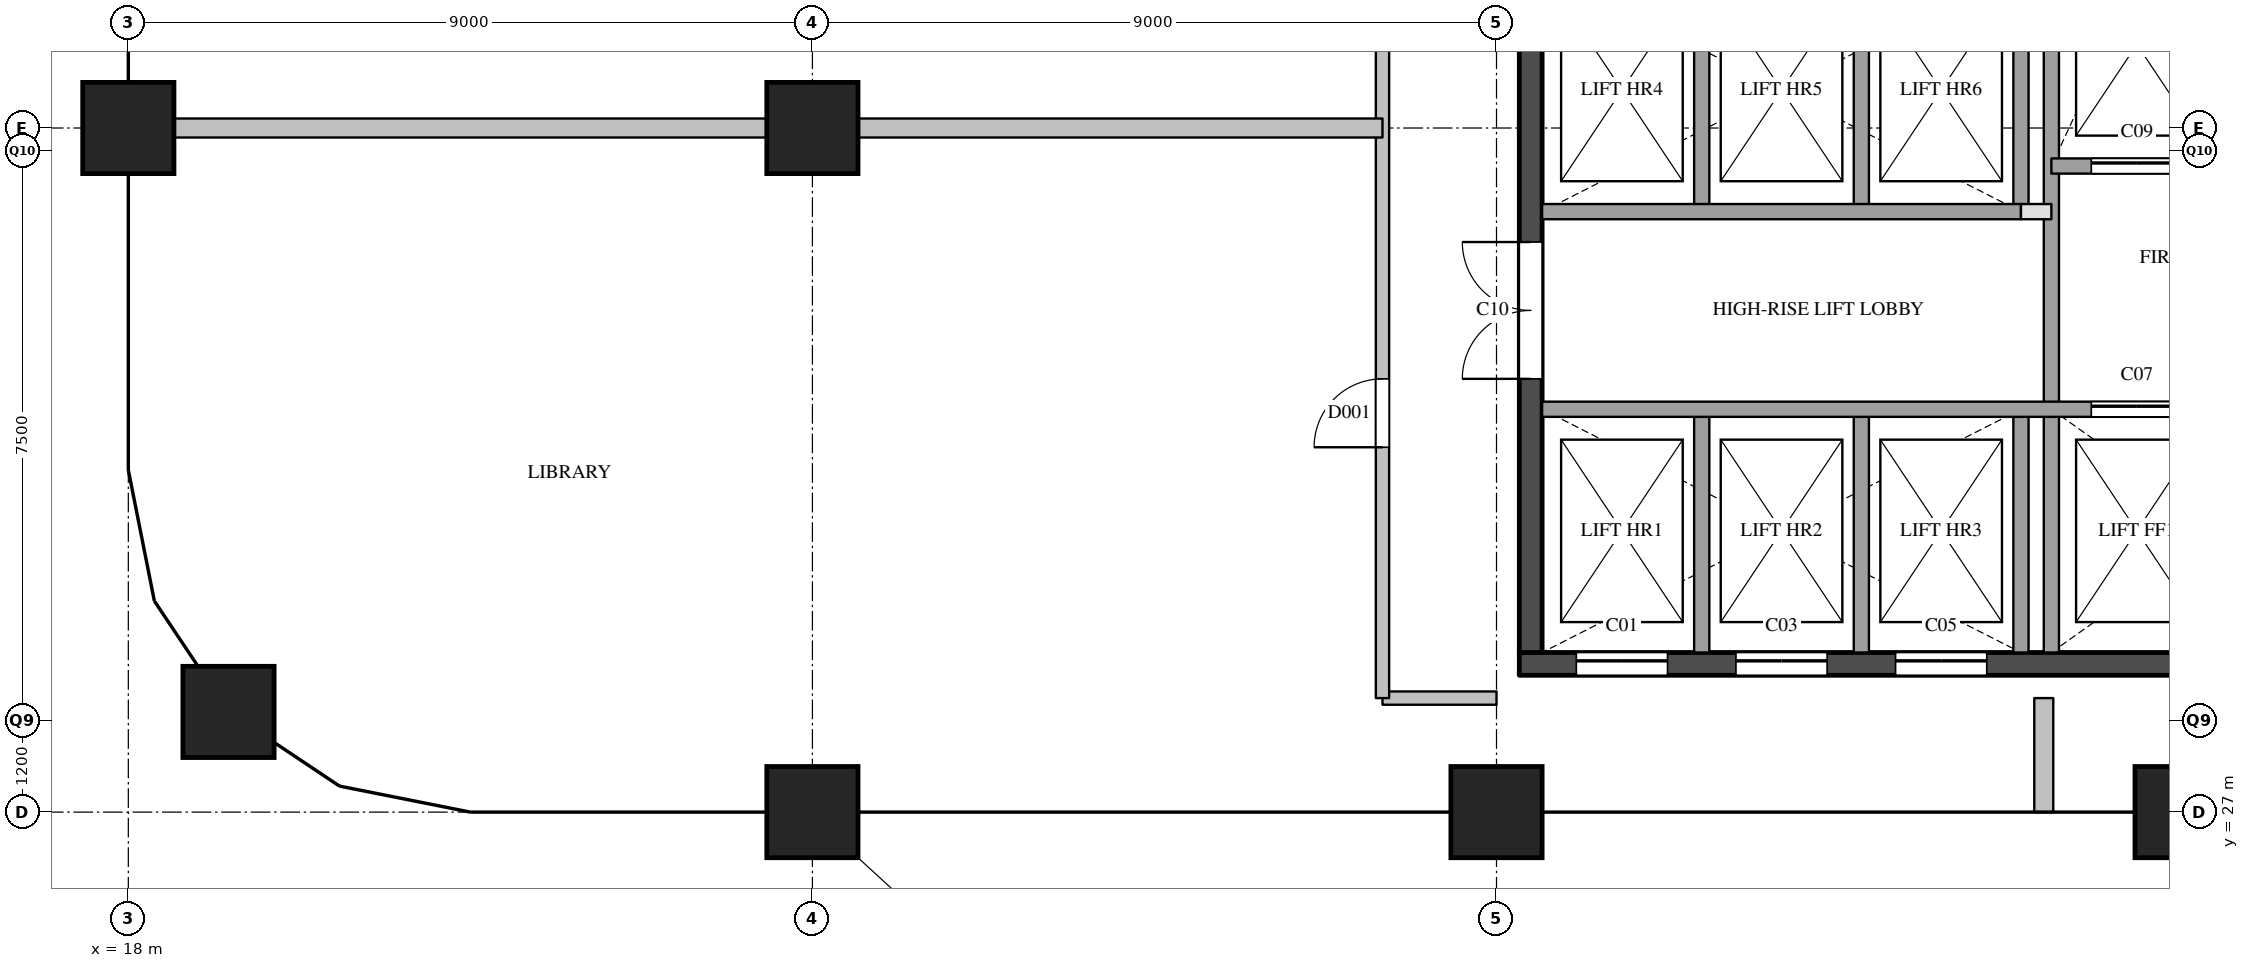
"""IFC4 building model, lengths in metres.
Left out: names, types, materials, properties, quantities, classifications, styles, units other than length and angle.
Written with IfcOpenShell. Run it as: python <this file> out.ifc"""

import sys

from ifc_helpers import new_model, si_unit, direction, frame, frame_2d, origin, origin_2d, place, context, subcontext, project, spatial, rectangle, extrude, element, fill, save


model = new_model("IFC4")
c1 = context("Model", 3, precision=1e-05, world=origin(), true_north=direction((0.0, 1.0)))
c2 = subcontext(c1, "Body", "Model", "MODEL_VIEW")
j1 = project(units=[si_unit("LENGTHUNIT", "METRE"), si_unit("PLANEANGLEUNIT", "RADIAN")], contexts=[c1])
p1 = place(None, origin())
s1 = spatial("IfcSite", under=j1, at=p1, CompositionType="ELEMENT")
p2 = place(p1, origin())
s2 = spatial("IfcBuilding", under=s1, at=p2, CompositionType="ELEMENT")
p3 = place(p2, frame((0.0, 0.0, 312.9)))
s3 = spatial("IfcBuildingStorey", under=s2, at=p3, CompositionType="ELEMENT", Elevation=312.9)
for number, where, z_axis, x_axis in (
    (1, (19.318, 28.318, 0.0), (0.0, 0.0, 1.0), (1.0, 0.0, 0.0)),
    (2, (18.0, 36.0, 0.0), (0.0, 0.0, 1.0), (1.0, 0.0, 0.0)),
    (3, (27.0, 27.0, 0.0), (0.0, 0.0, 1.0), (1.0, 0.0, 0.0)),
    (4, (27.0, 36.0, 0.0), (0.0, 0.0, 1.0), (1.0, 0.0, 0.0)),
    (5, (36.0, 27.0, 0.0), (0.0, 0.0, 1.0), (1.0, 0.0, 0.0)),
    (6, (45.0, 27.0, 0.0), (0.0, 0.0, 1.0), (1.0, 0.0, 0.0)),
):
    element("IfcColumn", number, at=place(p3, frame(where, z_axis=z_axis, x_axis=x_axis)), inside=s3, PredefinedType="COLUMN", context=c2, shape_type="SweptSolid", body=[
        extrude(rectangle(XDim=1.2, YDim=1.2, at=origin_2d()), origin(), (0.0, 0.0, 1.0), 3.9),
    ])
p4 = place(p3, frame((36.3, 28.95, 0.0), z_axis=(0.0, 0.0, 1.0), x_axis=(1.0, 0.0, 0.0)))
e7 = element("IfcWall", 7, at=p4, inside=s3, PredefinedType="SHEAR", context=c2, shape_type="SweptSolid", body=[
    extrude(rectangle(XDim=11.8, YDim=0.3, at=frame_2d((5.9, 0.0))), origin(), (0.0, 0.0, 1.0), 3.6),
])
p5 = place(p4, frame((0.75, 0.0, 0.0)))
e8 = element("IfcOpeningElement", 8, at=p5, cuts=e7, PredefinedType="OPENING", context=c2, shape_type="SweptSolid", body=[
    extrude(rectangle(XDim=1.2, YDim=2.1, at=frame_2d((0.6, 1.05))), frame((0.0, 0.16, 0.0), z_axis=(0.0, -1.0, 0.0), x_axis=(1.0, 0.0, 0.0)), (0.0, 0.0, 1.0), 0.32),
])
p6 = place(p4, frame((2.85, 0.0, 0.0)))
e9 = element("IfcOpeningElement", 9, at=p6, cuts=e7, PredefinedType="OPENING", context=c2, shape_type="SweptSolid", body=[
    extrude(rectangle(XDim=1.2, YDim=2.1, at=frame_2d((0.6, 1.05))), frame((0.0, 0.16, 0.0), z_axis=(0.0, -1.0, 0.0), x_axis=(1.0, 0.0, 0.0)), (0.0, 0.0, 1.0), 0.32),
])
p7 = place(p4, frame((4.95, 0.0, 0.0)))
e10 = element("IfcOpeningElement", 10, at=p7, cuts=e7, PredefinedType="OPENING", context=c2, shape_type="SweptSolid", body=[
    extrude(rectangle(XDim=1.2, YDim=2.1, at=frame_2d((0.6, 1.05))), frame((0.0, 0.16, 0.0), z_axis=(0.0, -1.0, 0.0), x_axis=(1.0, 0.0, 0.0)), (0.0, 0.0, 1.0), 0.32),
])
p8 = place(p3, frame((36.45, 29.1, 0.0), z_axis=(0.0, 0.0, 1.0), x_axis=(0.0, 1.0, 0.0)))
e11 = element("IfcWall", 11, at=p8, inside=s3, PredefinedType="SHEAR", context=c2, shape_type="SweptSolid", body=[
    extrude(rectangle(XDim=20.3, YDim=0.3, at=frame_2d((10.15, 0.0))), origin(), (0.0, 0.0, 1.0), 3.6),
])
p9 = place(p8, frame((3.6, 0.0, 0.0)))
e12 = element("IfcOpeningElement", 12, at=p9, cuts=e11, PredefinedType="OPENING", context=c2, shape_type="SweptSolid", body=[
    extrude(rectangle(XDim=1.8, YDim=2.1, at=frame_2d((0.9, 1.05))), frame((0.0, 0.16, 0.0), z_axis=(0.0, -1.0, 0.0), x_axis=(1.0, 0.0, 0.0)), (0.0, 0.0, 1.0), 0.32),
])
p10 = place(p8, frame((16.4, 0.0, 0.0)))
e13 = element("IfcOpeningElement", 13, at=p10, cuts=e11, PredefinedType="OPENING", context=c2, shape_type="SweptSolid", body=[
    extrude(rectangle(XDim=1.0, YDim=2.1, at=frame_2d((0.5, 1.05))), frame((0.0, 0.16, 0.0), z_axis=(0.0, -1.0, 0.0), x_axis=(1.0, 0.0, 0.0)), (0.0, 0.0, 1.0), 0.32),
])
p11 = place(p3, frame((38.7, 29.1, 0.0), z_axis=(0.0, 0.0, 1.0), x_axis=(0.0, 1.0, 0.0)))
e14 = element("IfcWall", 14, at=p11, inside=s3, PredefinedType="SOLIDWALL", context=c2, shape_type="SweptSolid", body=[
    extrude(rectangle(XDim=3.2, YDim=0.2, at=frame_2d((1.6, 0.0))), origin(), (0.0, 0.0, 1.0), 3.6),
])
p12 = place(p3, frame((38.7, 34.9, 0.0), z_axis=(0.0, 0.0, 1.0), x_axis=(0.0, 1.0, 0.0)))
e15 = element("IfcWall", 15, at=p12, inside=s3, PredefinedType="SOLIDWALL", context=c2, shape_type="SweptSolid", body=[
    extrude(rectangle(XDim=3.2, YDim=0.2, at=frame_2d((1.6, 0.0))), origin(), (0.0, 0.0, 1.0), 3.6),
])
p13 = place(p3, frame((40.8, 29.1, 0.0), z_axis=(0.0, 0.0, 1.0), x_axis=(0.0, 1.0, 0.0)))
e16 = element("IfcWall", 16, at=p13, inside=s3, PredefinedType="SOLIDWALL", context=c2, shape_type="SweptSolid", body=[
    extrude(rectangle(XDim=3.2, YDim=0.2, at=frame_2d((1.6, 0.0))), origin(), (0.0, 0.0, 1.0), 3.6),
])
p14 = place(p3, frame((40.8, 34.9, 0.0), z_axis=(0.0, 0.0, 1.0), x_axis=(0.0, 1.0, 0.0)))
e17 = element("IfcWall", 17, at=p14, inside=s3, PredefinedType="SOLIDWALL", context=c2, shape_type="SweptSolid", body=[
    extrude(rectangle(XDim=3.2, YDim=0.2, at=frame_2d((1.6, 0.0))), origin(), (0.0, 0.0, 1.0), 3.6),
])
p15 = place(p3, frame((42.9, 29.1, 0.0), z_axis=(0.0, 0.0, 1.0), x_axis=(0.0, 1.0, 0.0)))
e18 = element("IfcWall", 18, at=p15, inside=s3, PredefinedType="SOLIDWALL", context=c2, shape_type="SweptSolid", body=[
    extrude(rectangle(XDim=3.2, YDim=0.2, at=frame_2d((1.6, 0.0))), origin(), (0.0, 0.0, 1.0), 3.6),
])
p16 = place(p3, frame((42.9, 34.9, 0.0), z_axis=(0.0, 0.0, 1.0), x_axis=(0.0, 1.0, 0.0)))
e19 = element("IfcWall", 19, at=p16, inside=s3, PredefinedType="SOLIDWALL", context=c2, shape_type="SweptSolid", body=[
    extrude(rectangle(XDim=3.2, YDim=0.2, at=frame_2d((1.6, 0.0))), origin(), (0.0, 0.0, 1.0), 3.6),
])
p17 = place(p3, frame((43.3, 29.1, 0.0), z_axis=(0.0, 0.0, 1.0), x_axis=(0.0, 1.0, 0.0)))
e20 = element("IfcWall", 20, at=p17, inside=s3, PredefinedType="SOLIDWALL", context=c2, shape_type="SweptSolid", body=[
    extrude(rectangle(XDim=9.9, YDim=0.2, at=frame_2d((4.95, 0.0))), origin(), (0.0, 0.0, 1.0), 3.6),
])
p18 = place(p3, frame((36.6, 32.3, 0.0), z_axis=(0.0, 0.0, 1.0), x_axis=(1.0, 0.0, 0.0)))
e21 = element("IfcWall", 21, at=p18, inside=s3, PredefinedType="SOLIDWALL", context=c2, shape_type="SweptSolid", body=[
    extrude(rectangle(XDim=11.2, YDim=0.2, at=frame_2d((5.6, 0.0))), origin(), (0.0, 0.0, 1.0), 3.6),
])
p19 = place(p18, frame((7.225, 0.0, 0.0)))
e22 = element("IfcOpeningElement", 22, at=p19, cuts=e21, PredefinedType="OPENING", context=c2, shape_type="SweptSolid", body=[
    extrude(rectangle(XDim=1.2, YDim=2.1, at=frame_2d((0.6, 1.05))), frame((0.0, 0.11, 0.0), z_axis=(0.0, -1.0, 0.0), x_axis=(1.0, 0.0, 0.0)), (0.0, 0.0, 1.0), 0.22),
])
p20 = place(p18, frame((9.475, 0.0, 0.0)))
e23 = element("IfcOpeningElement", 23, at=p20, cuts=e21, PredefinedType="OPENING", context=c2, shape_type="SweptSolid", body=[
    extrude(rectangle(XDim=1.2, YDim=2.1, at=frame_2d((0.6, 1.05))), frame((0.0, 0.11, 0.0), z_axis=(0.0, -1.0, 0.0), x_axis=(1.0, 0.0, 0.0)), (0.0, 0.0, 1.0), 0.22),
])
p21 = place(p3, frame((42.9, 34.9, 0.0), z_axis=(0.0, 0.0, 1.0), x_axis=(1.0, 0.0, 0.0)))
e24 = element("IfcWall", 24, at=p21, inside=s3, PredefinedType="PARTITIONING", context=c2, shape_type="SweptSolid", body=[
    extrude(rectangle(XDim=0.4, YDim=0.2, at=frame_2d((0.2, 0.0))), origin(), (0.0, 0.0, 1.0), 3.6),
])
p22 = place(p3, frame((36.6, 34.9, 0.0), z_axis=(0.0, 0.0, 1.0), x_axis=(1.0, 0.0, 0.0)))
e25 = element("IfcWall", 25, at=p22, inside=s3, PredefinedType="SOLIDWALL", context=c2, shape_type="SweptSolid", body=[
    extrude(rectangle(XDim=6.3, YDim=0.2, at=frame_2d((3.15, 0.0))), origin(), (0.0, 0.0, 1.0), 3.6),
])
p23 = place(p3, frame((43.3, 35.5, 0.0), z_axis=(0.0, 0.0, 1.0), x_axis=(1.0, 0.0, 0.0)))
e26 = element("IfcWall", 26, at=p23, inside=s3, PredefinedType="SOLIDWALL", context=c2, shape_type="SweptSolid", body=[
    extrude(rectangle(XDim=4.5, YDim=0.2, at=frame_2d((2.25, 0.0))), origin(), (0.0, 0.0, 1.0), 3.6),
])
p24 = place(p23, frame((0.525, 0.0, 0.0)))
e27 = element("IfcOpeningElement", 27, at=p24, cuts=e26, PredefinedType="OPENING", context=c2, shape_type="SweptSolid", body=[
    extrude(rectangle(XDim=1.2, YDim=2.1, at=frame_2d((0.6, 1.05))), frame((0.0, 0.11, 0.0), z_axis=(0.0, -1.0, 0.0), x_axis=(1.0, 0.0, 0.0)), (0.0, 0.0, 1.0), 0.22),
])
p25 = place(p23, frame((3.025, 0.0, 0.0)))
e28 = element("IfcOpeningElement", 28, at=p25, cuts=e26, PredefinedType="OPENING", context=c2, shape_type="SweptSolid", body=[
    extrude(rectangle(XDim=0.7, YDim=2.1, at=frame_2d((0.35, 1.05))), frame((0.0, 0.11, 0.0), z_axis=(0.0, -1.0, 0.0), x_axis=(1.0, 0.0, 0.0)), (0.0, 0.0, 1.0), 0.22),
])
p26 = place(p3, frame((34.5, 28.5, 0.0), z_axis=(0.0, 0.0, 1.0), x_axis=(1.0, 0.0, 0.0)))
e29 = element("IfcWall", 29, at=p26, inside=s3, PredefinedType="PARTITIONING", context=c2, shape_type="SweptSolid", body=[
    extrude(rectangle(XDim=1.5, YDim=0.175, at=frame_2d((0.75, 0.0))), origin(), (0.0, 0.0, 1.0), 3.6),
])
p27 = place(p3, frame((34.5, 28.5, 0.0), z_axis=(0.0, 0.0, 1.0), x_axis=(0.0, 1.0, 0.0)))
e30 = element("IfcWall", 30, at=p27, inside=s3, PredefinedType="PARTITIONING", context=c2, shape_type="SweptSolid", body=[
    extrude(rectangle(XDim=23.0, YDim=0.175, at=frame_2d((11.5, 0.0))), origin(), (0.0, 0.0, 1.0), 3.6),
])
p28 = place(p27, frame((3.3, 0.0, 0.0)))
e31 = element("IfcOpeningElement", 31, at=p28, cuts=e30, PredefinedType="OPENING", context=c2, shape_type="SweptSolid", body=[
    extrude(rectangle(XDim=0.9, YDim=2.1, at=frame_2d((0.45, 1.05))), frame((0.0, 0.097, 0.0), z_axis=(0.0, -1.0, 0.0), x_axis=(1.0, 0.0, 0.0)), (0.0, 0.0, 1.0), 0.195),
])
p29 = place(p27, frame((14.8, 0.0, 0.0)))
e32 = element("IfcOpeningElement", 32, at=p29, cuts=e30, PredefinedType="OPENING", context=c2, shape_type="SweptSolid", body=[
    extrude(rectangle(XDim=0.9, YDim=2.1, at=frame_2d((0.45, 1.05))), frame((0.0, 0.097, 0.0), z_axis=(0.0, -1.0, 0.0), x_axis=(1.0, 0.0, 0.0)), (0.0, 0.0, 1.0), 0.195),
])
p30 = place(p3, frame((18.0, 36.0, 0.0), z_axis=(0.0, 0.0, 1.0), x_axis=(1.0, 0.0, 0.0)))
e33 = element("IfcWall", 33, at=p30, inside=s3, PredefinedType="PARTITIONING", context=c2, shape_type="SweptSolid", body=[
    extrude(rectangle(XDim=16.5, YDim=0.25, at=frame_2d((8.25, 0.0))), origin(), (0.0, 0.0, 1.0), 3.6),
])
p31 = place(p3, frame((43.2, 27.0, 0.0), z_axis=(0.0, 0.0, 1.0), x_axis=(0.0, 1.0, 0.0)))
e34 = element("IfcWall", 34, at=p31, inside=s3, PredefinedType="PARTITIONING", context=c2, shape_type="SweptSolid", body=[
    extrude(rectangle(XDim=1.5, YDim=0.25, at=frame_2d((0.75, 0.0))), origin(), (0.0, 0.0, 1.0), 2.6),
])
p32 = place(p5, origin())
e35 = element("IfcDoor", 35, at=p32, inside=s3, OperationType="SLIDING_TO_LEFT", PredefinedType="DOOR", context=c2, shape_type="SweptSolid", body=[
    extrude(rectangle(XDim=1.2, YDim=2.1, at=frame_2d((0.6, 1.05))), frame((0.0, 0.025, 0.0), z_axis=(0.0, -1.0, 0.0), x_axis=(1.0, 0.0, 0.0)), (0.0, 0.0, 1.0), 0.05),
])
fill(e8, e35)
p33 = place(p6, origin())
e36 = element("IfcDoor", 36, at=p33, inside=s3, OperationType="SLIDING_TO_LEFT", PredefinedType="DOOR", context=c2, shape_type="SweptSolid", body=[
    extrude(rectangle(XDim=1.2, YDim=2.1, at=frame_2d((0.6, 1.05))), frame((0.0, 0.025, 0.0), z_axis=(0.0, -1.0, 0.0), x_axis=(1.0, 0.0, 0.0)), (0.0, 0.0, 1.0), 0.05),
])
fill(e9, e36)
p34 = place(p7, origin())
e37 = element("IfcDoor", 37, at=p34, inside=s3, OperationType="SLIDING_TO_LEFT", PredefinedType="DOOR", context=c2, shape_type="SweptSolid", body=[
    extrude(rectangle(XDim=1.2, YDim=2.1, at=frame_2d((0.6, 1.05))), frame((0.0, 0.025, 0.0), z_axis=(0.0, -1.0, 0.0), x_axis=(1.0, 0.0, 0.0)), (0.0, 0.0, 1.0), 0.05),
])
fill(e10, e37)
p35 = place(p19, origin())
e38 = element("IfcDoor", 38, at=p35, inside=s3, OperationType="SLIDING_TO_LEFT", PredefinedType="DOOR", context=c2, shape_type="SweptSolid", body=[
    extrude(rectangle(XDim=1.2, YDim=2.1, at=frame_2d((0.6, 1.05))), frame((0.0, 0.025, 0.0), z_axis=(0.0, -1.0, 0.0), x_axis=(1.0, 0.0, 0.0)), (0.0, 0.0, 1.0), 0.05),
])
fill(e22, e38)
p36 = place(p24, origin())
e39 = element("IfcDoor", 39, at=p36, inside=s3, OperationType="SLIDING_TO_LEFT", PredefinedType="DOOR", context=c2, shape_type="SweptSolid", body=[
    extrude(rectangle(XDim=1.2, YDim=2.1, at=frame_2d((0.6, 1.05))), frame((0.0, 0.025, 0.0), z_axis=(0.0, -1.0, 0.0), x_axis=(1.0, 0.0, 0.0)), (0.0, 0.0, 1.0), 0.05),
])
fill(e27, e39)
p37 = place(p9, origin())
e40 = element("IfcDoor", 40, at=p37, inside=s3, OperationType="DOUBLE_DOOR_SINGLE_SWING", PredefinedType="DOOR", context=c2, shape_type="SweptSolid", body=[
    extrude(rectangle(XDim=1.8, YDim=2.1, at=frame_2d((0.9, 1.05))), frame((0.0, 0.025, 0.0), z_axis=(0.0, -1.0, 0.0), x_axis=(1.0, 0.0, 0.0)), (0.0, 0.0, 1.0), 0.05),
])
fill(e12, e40)
p38 = place(p28, origin())
e41 = element("IfcDoor", 41, at=p38, inside=s3, OperationType="SINGLE_SWING_LEFT", PredefinedType="DOOR", context=c2, shape_type="SweptSolid", body=[
    extrude(rectangle(XDim=0.9, YDim=2.1, at=frame_2d((0.45, 1.05))), frame((0.0, 0.025, 0.0), z_axis=(0.0, -1.0, 0.0), x_axis=(1.0, 0.0, 0.0)), (0.0, 0.0, 1.0), 0.05),
])
fill(e31, e41)
save(model, sys.argv[1])
